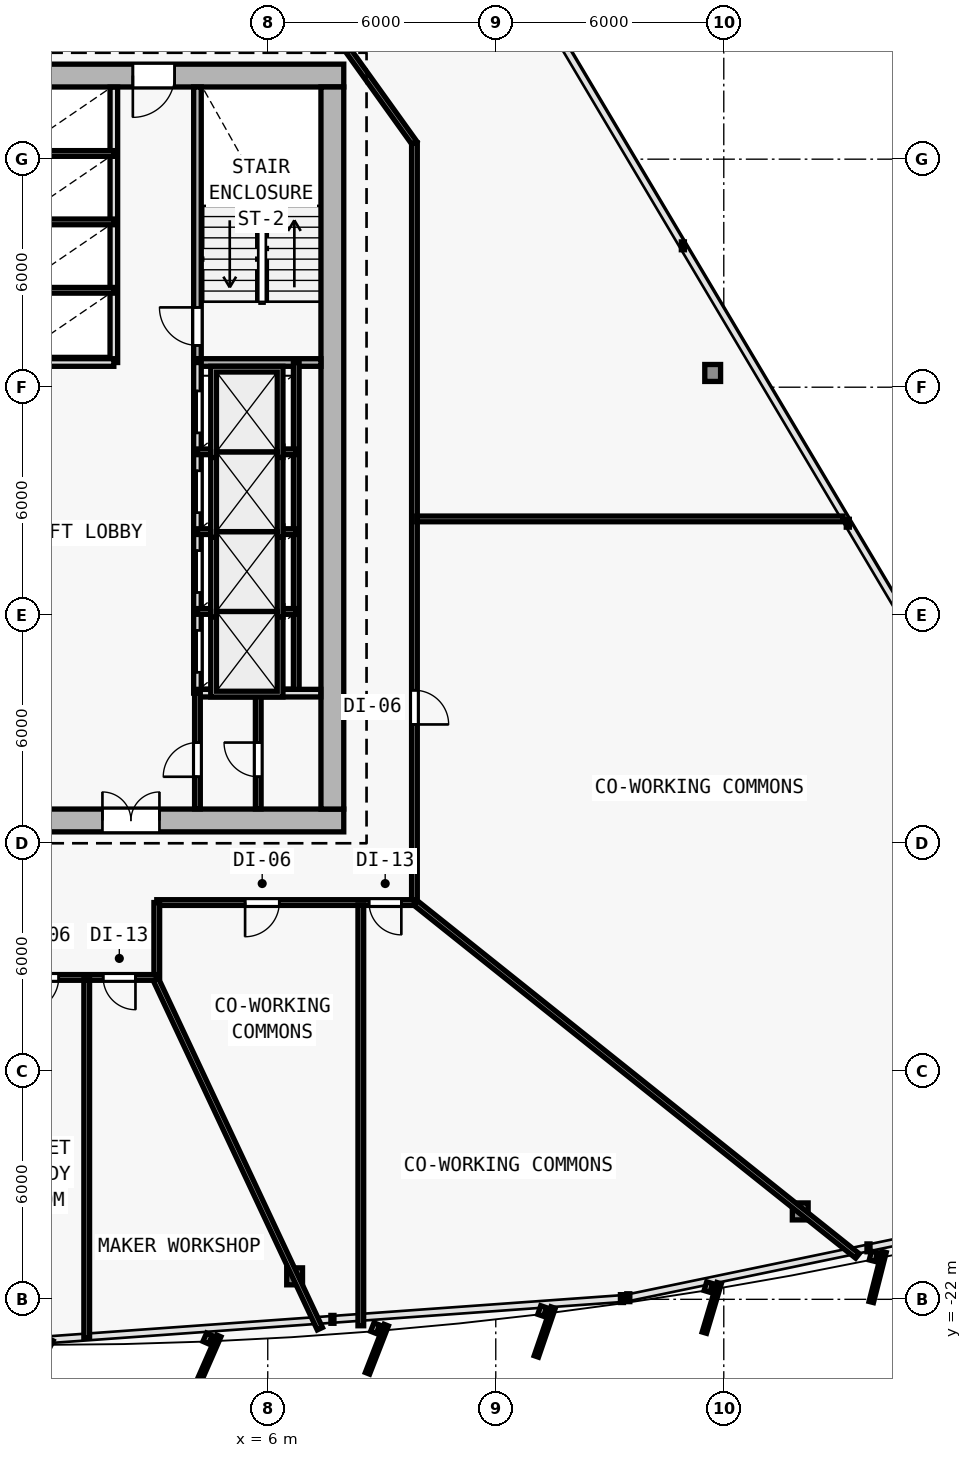
"""IFC4 building model, lengths in metres.
Left out: names, types, materials, properties, quantities, classifications, styles, units other than length and angle.
Written with IfcOpenShell. Run it as: python <this file> out.ifc"""

import sys

from ifc_helpers import new_model, si_unit, direction, frame, frame_2d, origin, origin_2d, place, context, subcontext, project, spatial, rectangle, i_section, extrude, element, fill, save


model = new_model("IFC4")
c1 = context("Model", 3, precision=1e-05, world=origin(), true_north=direction((0.0, 1.0)))
c2 = subcontext(c1, "Body", "Model", "MODEL_VIEW")
j1 = project(units=[si_unit("LENGTHUNIT", "METRE"), si_unit("PLANEANGLEUNIT", "RADIAN")], contexts=[c1])
p1 = place(None, origin())
s1 = spatial("IfcSite", under=j1, at=p1, CompositionType="ELEMENT")
p2 = place(p1, origin())
s2 = spatial("IfcBuilding", under=s1, at=p2, CompositionType="ELEMENT")
p3 = place(p2, frame((0.0, 0.0, 44.4)))
s3 = spatial("IfcBuildingStorey", under=s2, at=p3, CompositionType="ELEMENT", Elevation=44.4)
for number, where, z_axis, x_axis in (
    (1, (7.7, -9.4, 0.0), (0.0, 0.0, 1.0), (1.0, 0.0, 0.0)),
    (2, (7.7, 10.2, 0.0), (0.0, 0.0, 1.0), (1.0, 0.0, 0.0)),
    (3, (7.7, 0.4, 0.0), (0.0, 0.0, 1.0), (1.0, 0.0, 0.0)),
):
    element("IfcColumn", number, at=place(p3, frame(where, z_axis=z_axis, x_axis=x_axis)), inside=s3, PredefinedType="COLUMN", context=c2, shape_type="SweptSolid", body=[
        extrude(i_section(OverallWidth=0.416, OverallDepth=0.446, WebThickness=0.025, FlangeThickness=0.04, FilletRadius=0.015, at=origin_2d()), origin(), (0.0, 0.0, 1.0), 3.6),
    ])
p4 = place(p3, frame((6.707, -21.395, 0.006), z_axis=(-0.006934288159, 0.035283289748, 0.999353293441), x_axis=(-0.981229659911, -0.192842823335, 0.0)))
e4 = element("IfcColumn", 4, at=p4, inside=s3, PredefinedType="COLUMN", context=c2, shape_type="SweptSolid", body=[
    extrude(i_section(OverallWidth=0.416, OverallDepth=0.446, WebThickness=0.025, FlangeThickness=0.04, FilletRadius=0.015, at=origin_2d()), origin(), (0.0, 0.0, 1.0), 3.591),
])
p5 = place(p3, frame((20.012, -19.687, 0.006), z_axis=(-0.020596245868, 0.03357935795, 0.999223809452), x_axis=(-0.852427604955, -0.522845271865, 0.0)))
e5 = element("IfcColumn", 5, at=p5, inside=s3, PredefinedType="COLUMN", context=c2, shape_type="SweptSolid", body=[
    extrude(i_section(OverallWidth=0.416, OverallDepth=0.446, WebThickness=0.025, FlangeThickness=0.04, FilletRadius=0.015, at=origin_2d()), origin(), (0.0, 0.0, 1.0), 3.592),
])
p6 = place(p3, frame((17.708, 2.375, 0.006), z_axis=(-0.018975301738, 0.00958966862, 0.999773962543), x_axis=(-0.451048184688, -0.89249959949, 0.0)))
e6 = element("IfcColumn", 6, at=p6, inside=s3, PredefinedType="COLUMN", context=c2, shape_type="SweptSolid", body=[
    extrude(i_section(OverallWidth=0.416, OverallDepth=0.446, WebThickness=0.025, FlangeThickness=0.04, FilletRadius=0.015, at=origin_2d()), origin(), (0.0, 0.0, 1.0), 3.59),
])
p7 = place(p3, frame((-8.0, -9.4, 0.0), z_axis=(0.0, 0.0, 1.0), x_axis=(1.0, 0.0, 0.0)))
e7 = element("IfcWall", 7, at=p7, inside=s3, PredefinedType="SHEAR", context=c2, shape_type="SweptSolid", body=[
    extrude(rectangle(XDim=16.0, YDim=0.6, at=frame_2d((8.0, 0.0))), origin(), (0.0, 0.0, 1.0), 3.35),
])
p8 = place(p7, frame((9.65, 0.0, 0.0)))
e8 = element("IfcOpeningElement", 8, at=p8, cuts=e7, PredefinedType="OPENING", context=c2, shape_type="SweptSolid", body=[
    extrude(rectangle(XDim=1.5, YDim=2.2, at=frame_2d((0.75, 1.1))), frame((0.0, 0.31, 0.0), z_axis=(0.0, -1.0, 0.0), x_axis=(1.0, 0.0, 0.0)), (0.0, 0.0, 1.0), 0.62),
])
p9 = place(p3, frame((8.0, 10.2, 0.0), z_axis=(0.0, 0.0, 1.0), x_axis=(-1.0, 0.0, 0.0)))
e9 = element("IfcWall", 9, at=p9, inside=s3, PredefinedType="SHEAR", context=c2, shape_type="SweptSolid", body=[
    extrude(rectangle(XDim=16.0, YDim=0.6, at=frame_2d((8.0, 0.0))), origin(), (0.0, 0.0, 1.0), 3.35),
])
p10 = place(p9, frame((4.45, 0.0, 0.0)))
e10 = element("IfcOpeningElement", 10, at=p10, cuts=e9, PredefinedType="OPENING", context=c2, shape_type="SweptSolid", body=[
    extrude(rectangle(XDim=1.1, YDim=2.15, at=frame_2d((0.55, 1.075))), frame((0.0, 0.31, 0.0), z_axis=(0.0, -1.0, 0.0), x_axis=(1.0, 0.0, 0.0)), (0.0, 0.0, 1.0), 0.62),
])
p11 = place(p3, frame((7.7, 9.9, 0.0), z_axis=(0.0, 0.0, 1.0), x_axis=(0.0, -1.0, 0.0)))
e11 = element("IfcWall", 11, at=p11, inside=s3, PredefinedType="SHEAR", context=c2, shape_type="SweptSolid", body=[
    extrude(rectangle(XDim=19.0, YDim=0.6, at=frame_2d((9.5, 0.0))), origin(), (0.0, 0.0, 1.0), 3.35),
])
p12 = place(p3, frame((4.15, 2.75, 0.0), z_axis=(0.0, 0.0, 1.0), x_axis=(0.0, 1.0, 0.0)))
e12 = element("IfcWall", 12, at=p12, inside=s3, PredefinedType="SOLIDWALL", context=c2, shape_type="SweptSolid", body=[
    extrude(rectangle(XDim=7.15, YDim=0.2, at=frame_2d((3.575, 0.0))), origin(), (0.0, 0.0, 1.0), 3.35),
])
p13 = place(p12, frame((0.35, 0.0, 0.0)))
e13 = element("IfcOpeningElement", 13, at=p13, cuts=e12, PredefinedType="OPENING", context=c2, shape_type="SweptSolid", body=[
    extrude(rectangle(XDim=1.0, YDim=2.15, at=frame_2d((0.5, 1.075))), frame((0.0, 0.11, 0.0), z_axis=(0.0, -1.0, 0.0), x_axis=(1.0, 0.0, 0.0)), (0.0, 0.0, 1.0), 0.22),
])
p14 = place(p3, frame((4.05, 2.65, 0.0), z_axis=(0.0, 0.0, 1.0), x_axis=(1.0, 0.0, 0.0)))
e14 = element("IfcWall", 14, at=p14, inside=s3, PredefinedType="SOLIDWALL", context=c2, shape_type="SweptSolid", body=[
    extrude(rectangle(XDim=3.35, YDim=0.2, at=frame_2d((1.675, 0.0))), origin(), (0.0, 0.0, 1.0), 3.35),
])
p15 = place(p3, frame((4.15, -6.05, 0.0), z_axis=(0.0, 0.0, 1.0), x_axis=(0.0, 1.0, 0.0)))
e15 = element("IfcWall", 15, at=p15, inside=s3, PredefinedType="SOLIDWALL", context=c2, shape_type="SweptSolid", body=[
    extrude(rectangle(XDim=8.7, YDim=0.2, at=frame_2d((4.35, 0.0))), origin(), (0.0, 0.0, 1.0), 3.35),
])
p16 = place(p15, frame((0.55, 0.0, 0.0)))
e16 = element("IfcOpeningElement", 16, at=p16, cuts=e15, PredefinedType="OPENING", context=c2, shape_type="SweptSolid", body=[
    extrude(rectangle(XDim=1.1, YDim=2.15, at=frame_2d((0.55, 1.075))), frame((0.0, 0.11, 0.0), z_axis=(0.0, -1.0, 0.0), x_axis=(1.0, 0.0, 0.0)), (0.0, 0.0, 1.0), 0.22),
])
p17 = place(p15, frame((2.65, 0.0, 0.0)))
e17 = element("IfcOpeningElement", 17, at=p17, cuts=e15, PredefinedType="OPENING", context=c2, shape_type="SweptSolid", body=[
    extrude(rectangle(XDim=1.1, YDim=2.15, at=frame_2d((0.55, 1.075))), frame((0.0, 0.11, 0.0), z_axis=(0.0, -1.0, 0.0), x_axis=(1.0, 0.0, 0.0)), (0.0, 0.0, 1.0), 0.22),
])
p18 = place(p15, frame((4.75, 0.0, 0.0)))
e18 = element("IfcOpeningElement", 18, at=p18, cuts=e15, PredefinedType="OPENING", context=c2, shape_type="SweptSolid", body=[
    extrude(rectangle(XDim=1.1, YDim=2.15, at=frame_2d((0.55, 1.075))), frame((0.0, 0.11, 0.0), z_axis=(0.0, -1.0, 0.0), x_axis=(1.0, 0.0, 0.0)), (0.0, 0.0, 1.0), 0.22),
])
p19 = place(p15, frame((6.85, 0.0, 0.0)))
e19 = element("IfcOpeningElement", 19, at=p19, cuts=e15, PredefinedType="OPENING", context=c2, shape_type="SweptSolid", body=[
    extrude(rectangle(XDim=1.1, YDim=2.15, at=frame_2d((0.55, 1.075))), frame((0.0, 0.11, 0.0), z_axis=(0.0, -1.0, 0.0), x_axis=(1.0, 0.0, 0.0)), (0.0, 0.0, 1.0), 0.22),
])
p20 = place(p3, frame((6.75, -6.05, 0.0), z_axis=(0.0, 0.0, 1.0), x_axis=(0.0, 1.0, 0.0)))
e20 = element("IfcWall", 20, at=p20, inside=s3, PredefinedType="PARTITIONING", context=c2, shape_type="SweptSolid", body=[
    extrude(rectangle(XDim=8.7, YDim=0.15, at=frame_2d((4.35, 0.0))), origin(), (0.0, 0.0, 1.0), 3.35),
])
for number, where, z_axis, x_axis in (
    (21, (4.15, -3.9, 0.0), (0.0, 0.0, 1.0), (1.0, 0.0, 0.0)),
    (22, (4.15, -1.8, 0.0), (0.0, 0.0, 1.0), (1.0, 0.0, 0.0)),
    (23, (4.15, 0.3, 0.0), (0.0, 0.0, 1.0), (1.0, 0.0, 0.0)),
):
    element("IfcWall", number, at=place(p3, frame(where, z_axis=z_axis, x_axis=x_axis)), inside=s3, PredefinedType="PARTITIONING", context=c2, shape_type="SweptSolid", body=[
        extrude(rectangle(XDim=2.6, YDim=0.15, at=frame_2d((1.3, 0.0))), origin(), (0.0, 0.0, 1.0), 3.35),
    ])
p21 = place(p3, frame((1.95, 2.65, 0.0), z_axis=(0.0, 0.0, 1.0), x_axis=(0.0, 1.0, 0.0)))
e24 = element("IfcWall", 24, at=p21, inside=s3, PredefinedType="SOLIDWALL", context=c2, shape_type="SweptSolid", body=[
    extrude(rectangle(XDim=7.245, YDim=0.2, at=frame_2d((3.623, 0.0))), origin(), (0.0, 0.0, 1.0), 3.35),
])
p22 = place(p3, frame((-0.95, 2.65, 0.0), z_axis=(0.0, 0.0, 1.0), x_axis=(1.0, 0.0, 0.0)))
e25 = element("IfcWall", 25, at=p22, inside=s3, PredefinedType="SOLIDWALL", context=c2, shape_type="SweptSolid", body=[
    extrude(rectangle(XDim=2.9, YDim=0.2, at=frame_2d((1.45, 0.0))), origin(), (0.0, 0.0, 1.0), 3.35),
])
for number, where, z_axis, x_axis in (
    (26, (-0.75, 4.55, 0.0), (0.0, 0.0, 1.0), (1.0, 0.0, 0.0)),
    (27, (-0.75, 6.35, 0.0), (0.0, 0.0, 1.0), (1.0, 0.0, 0.0)),
    (28, (-0.75, 8.15, 0.0), (0.0, 0.0, 1.0), (1.0, 0.0, 0.0)),
):
    element("IfcWall", number, at=place(p3, frame(where, z_axis=z_axis, x_axis=x_axis)), inside=s3, PredefinedType="PARTITIONING", context=c2, shape_type="SweptSolid", body=[
        extrude(rectangle(XDim=2.7, YDim=0.15, at=frame_2d((1.35, 0.0))), origin(), (0.0, 0.0, 1.0), 3.35),
    ])
p23 = place(p3, frame((4.15, -6.05, 0.0), z_axis=(0.0, 0.0, 1.0), x_axis=(1.0, 0.0, 0.0)))
e29 = element("IfcWall", 29, at=p23, inside=s3, PredefinedType="SOLIDWALL", context=c2, shape_type="SweptSolid", body=[
    extrude(rectangle(XDim=3.245, YDim=0.2, at=frame_2d((1.623, 0.0))), origin(), (0.0, 0.0, 1.0), 3.35),
])
p24 = place(p3, frame((4.15, -9.095, 0.0), z_axis=(0.0, 0.0, 1.0), x_axis=(0.0, 1.0, 0.0)))
e30 = element("IfcWall", 30, at=p24, inside=s3, PredefinedType="PARTITIONING", context=c2, shape_type="SweptSolid", body=[
    extrude(rectangle(XDim=3.045, YDim=0.15, at=frame_2d((1.522, 0.0))), origin(), (0.0, 0.0, 1.0), 3.35),
])
p25 = place(p24, frame((0.845, 0.0, 0.0)))
e31 = element("IfcOpeningElement", 31, at=p25, cuts=e30, PredefinedType="OPENING", context=c2, shape_type="SweptSolid", body=[
    extrude(rectangle(XDim=0.9, YDim=2.1, at=frame_2d((0.45, 1.05))), frame((0.0, 0.085, 0.0), z_axis=(0.0, -1.0, 0.0), x_axis=(1.0, 0.0, 0.0)), (0.0, 0.0, 1.0), 0.17),
])
p26 = place(p3, frame((5.75, -9.095, 0.0), z_axis=(0.0, 0.0, 1.0), x_axis=(0.0, 1.0, 0.0)))
e32 = element("IfcWall", 32, at=p26, inside=s3, PredefinedType="PARTITIONING", context=c2, shape_type="SweptSolid", body=[
    extrude(rectangle(XDim=3.045, YDim=0.15, at=frame_2d((1.522, 0.0))), origin(), (0.0, 0.0, 1.0), 3.35),
])
p27 = place(p26, frame((0.845, 0.0, 0.0)))
e33 = element("IfcOpeningElement", 33, at=p27, cuts=e32, PredefinedType="OPENING", context=c2, shape_type="SweptSolid", body=[
    extrude(rectangle(XDim=0.9, YDim=2.1, at=frame_2d((0.45, 1.05))), frame((0.0, 0.085, 0.0), z_axis=(0.0, -1.0, 0.0), x_axis=(1.0, 0.0, 0.0)), (0.0, 0.0, 1.0), 0.17),
])
p28 = place(p3, frame((7.041, 12.36, 0.0), z_axis=(0.0, 0.0, 1.0), x_axis=(0.582449511476, -0.812866881218, 0.0)))
e34 = element("IfcWall", 34, at=p28, inside=s3, PredefinedType="PARTITIONING", context=c2, shape_type="SweptSolid", body=[
    extrude(rectangle(XDim=4.84, YDim=0.15, at=frame_2d((2.42, 0.0))), origin(), (0.0, 0.0, 1.0), 2.725),
])
p29 = place(p3, frame((9.86, 8.426, 0.0), z_axis=(0.0, 0.0, 1.0), x_axis=(0.0, -1.0, 0.0)))
e35 = element("IfcWall", 35, at=p29, inside=s3, PredefinedType="PARTITIONING", context=c2, shape_type="SweptSolid", body=[
    extrude(rectangle(XDim=19.986, YDim=0.15, at=frame_2d((9.993, 0.0))), origin(), (0.0, 0.0, 1.0), 2.609),
])
p30 = place(p29, frame((14.399, 0.0, 0.0)))
e36 = element("IfcOpeningElement", 36, at=p30, cuts=e35, PredefinedType="OPENING", context=c2, shape_type="SweptSolid", body=[
    extrude(rectangle(XDim=0.9, YDim=2.1, at=frame_2d((0.45, 1.05))), frame((0.0, 0.085, 0.0), z_axis=(0.0, -1.0, 0.0), x_axis=(1.0, 0.0, 0.0)), (0.0, 0.0, 1.0), 0.17),
])
p31 = place(p3, frame((9.86, -11.56, 0.0), z_axis=(0.0, 0.0, 1.0), x_axis=(-1.0, 0.0, 0.0)))
e37 = element("IfcWall", 37, at=p31, inside=s3, PredefinedType="PARTITIONING", context=c2, shape_type="SweptSolid", body=[
    extrude(rectangle(XDim=6.78, YDim=0.15, at=frame_2d((3.39, 0.0))), origin(), (0.0, 0.0, 1.0), 2.609),
])
p32 = place(p31, frame((3.556, 0.0, 0.0)))
e38 = element("IfcOpeningElement", 38, at=p32, cuts=e37, PredefinedType="OPENING", context=c2, shape_type="SweptSolid", body=[
    extrude(rectangle(XDim=0.9, YDim=2.1, at=frame_2d((0.45, 1.05))), frame((0.0, 0.085, 0.0), z_axis=(0.0, -1.0, 0.0), x_axis=(1.0, 0.0, 0.0)), (0.0, 0.0, 1.0), 0.17),
])
p33 = place(p31, frame((0.344, 0.0, 0.0)))
e39 = element("IfcOpeningElement", 39, at=p33, cuts=e37, PredefinedType="OPENING", context=c2, shape_type="SweptSolid", body=[
    extrude(rectangle(XDim=0.85, YDim=2.1, at=frame_2d((0.425, 1.05))), frame((0.0, 0.085, 0.0), z_axis=(0.0, -1.0, 0.0), x_axis=(1.0, 0.0, 0.0)), (0.0, 0.0, 1.0), 0.17),
])
p34 = place(p3, frame((3.08, -11.56, 0.0), z_axis=(0.0, 0.0, 1.0), x_axis=(0.0, -1.0, 0.0)))
e40 = element("IfcWall", 40, at=p34, inside=s3, PredefinedType="PARTITIONING", context=c2, shape_type="SweptSolid", body=[
    extrude(rectangle(XDim=1.97, YDim=0.15, at=frame_2d((0.985, 0.0))), origin(), (0.0, 0.0, 1.0), 3.025),
])
p35 = place(p3, frame((3.08, -13.53, 0.0), z_axis=(0.0, 0.0, 1.0), x_axis=(-1.0, 0.0, 0.0)))
e41 = element("IfcWall", 41, at=p35, inside=s3, PredefinedType="PARTITIONING", context=c2, shape_type="SweptSolid", body=[
    extrude(rectangle(XDim=6.16, YDim=0.15, at=frame_2d((3.08, 0.0))), origin(), (0.0, 0.0, 1.0), 2.725),
])
p36 = place(p35, frame((4.69, 0.0, 0.0)))
e42 = element("IfcOpeningElement", 42, at=p36, cuts=e41, PredefinedType="OPENING", context=c2, shape_type="SweptSolid", body=[
    extrude(rectangle(XDim=0.9, YDim=2.1, at=frame_2d((0.45, 1.05))), frame((0.0, 0.085, 0.0), z_axis=(0.0, -1.0, 0.0), x_axis=(1.0, 0.0, 0.0)), (0.0, 0.0, 1.0), 0.17),
])
p37 = place(p35, frame((2.581, 0.0, 0.0)))
e43 = element("IfcOpeningElement", 43, at=p37, cuts=e41, PredefinedType="OPENING", context=c2, shape_type="SweptSolid", body=[
    extrude(rectangle(XDim=0.9, YDim=2.1, at=frame_2d((0.45, 1.05))), frame((0.0, 0.085, 0.0), z_axis=(0.0, -1.0, 0.0), x_axis=(1.0, 0.0, 0.0)), (0.0, 0.0, 1.0), 0.17),
])
p38 = place(p35, frame((0.561, 0.0, 0.0)))
e44 = element("IfcOpeningElement", 44, at=p38, cuts=e41, PredefinedType="OPENING", context=c2, shape_type="SweptSolid", body=[
    extrude(rectangle(XDim=0.85, YDim=2.1, at=frame_2d((0.425, 1.05))), frame((0.0, 0.085, 0.0), z_axis=(0.0, -1.0, 0.0), x_axis=(1.0, 0.0, 0.0)), (0.0, 0.0, 1.0), 0.17),
])
p39 = place(p3, frame((3.053, -13.579, 0.0), z_axis=(0.0, 0.0, 1.0), x_axis=(0.425109320036, -0.905142014282, 0.0)))
e45 = element("IfcWall", 45, at=p39, inside=s3, PredefinedType="PARTITIONING", context=c2, shape_type="SweptSolid", body=[
    extrude(rectangle(XDim=10.157, YDim=0.15, at=frame_2d((5.079, 0.0))), origin(), (0.0, 0.0, 1.0), 2.725),
])
p40 = place(p3, frame((9.888, -11.569, 0.0), z_axis=(0.0, 0.0, 1.0), x_axis=(0.781299107074, -0.624156795433, 0.0)))
e46 = element("IfcWall", 46, at=p40, inside=s3, PredefinedType="PARTITIONING", context=c2, shape_type="SweptSolid", body=[
    extrude(rectangle(XDim=14.884, YDim=0.15, at=frame_2d((7.442, 0.0))), origin(), (0.0, 0.0, 1.0), 2.609),
])
p41 = place(p3, frame((1.236, -13.59, 0.0), z_axis=(0.0, 0.0, 1.0), x_axis=(0.0, -1.0, 0.0)))
e47 = element("IfcWall", 47, at=p41, inside=s3, PredefinedType="PARTITIONING", context=c2, shape_type="SweptSolid", body=[
    extrude(rectangle(XDim=9.427, YDim=0.15, at=frame_2d((4.714, 0.0))), origin(), (0.0, 0.0, 1.0), 2.735),
])
p42 = place(p3, frame((8.449, -11.62, 0.0), z_axis=(0.0, 0.0, 1.0), x_axis=(0.0, -1.0, 0.0)))
e48 = element("IfcWall", 48, at=p42, inside=s3, PredefinedType="PARTITIONING", context=c2, shape_type="SweptSolid", body=[
    extrude(rectangle(XDim=11.075, YDim=0.15, at=frame_2d((5.538, 0.0))), origin(), (0.0, 0.0, 1.0), 2.735),
])
p43 = place(p3, frame((9.92, -1.465, 0.0), z_axis=(0.0, 0.0, 1.0), x_axis=(1.0, 0.0, 0.0)))
e49 = element("IfcWall", 49, at=p43, inside=s3, PredefinedType="PARTITIONING", context=c2, shape_type="SweptSolid", body=[
    extrude(rectangle(XDim=11.218, YDim=0.15, at=frame_2d((5.609, 0.0))), origin(), (0.0, 0.0, 1.0), 2.735),
])
p44 = place(p8, origin())
e50 = element("IfcDoor", 50, at=p44, inside=s3, OperationType="DOUBLE_DOOR_SINGLE_SWING", PredefinedType="DOOR", context=c2, shape_type="SweptSolid", body=[
    extrude(rectangle(XDim=1.5, YDim=2.2, at=frame_2d((0.75, 1.1))), frame((0.0, 0.025, 0.0), z_axis=(0.0, -1.0, 0.0), x_axis=(1.0, 0.0, 0.0)), (0.0, 0.0, 1.0), 0.05),
])
fill(e8, e50)
p45 = place(p10, origin())
e51 = element("IfcDoor", 51, at=p45, inside=s3, OperationType="SINGLE_SWING_RIGHT", PredefinedType="DOOR", context=c2, shape_type="SweptSolid", body=[
    extrude(rectangle(XDim=1.1, YDim=2.15, at=frame_2d((0.55, 1.075))), frame((0.0, 0.025, 0.0), z_axis=(0.0, -1.0, 0.0), x_axis=(1.0, 0.0, 0.0)), (0.0, 0.0, 1.0), 0.05),
])
fill(e10, e51)
p46 = place(p13, origin())
e52 = element("IfcDoor", 52, at=p46, inside=s3, OperationType="SINGLE_SWING_RIGHT", PredefinedType="DOOR", context=c2, shape_type="SweptSolid", body=[
    extrude(rectangle(XDim=1.0, YDim=2.15, at=frame_2d((0.5, 1.075))), frame((0.0, 0.025, 0.0), z_axis=(0.0, -1.0, 0.0), x_axis=(1.0, 0.0, 0.0)), (0.0, 0.0, 1.0), 0.05),
])
fill(e13, e52)
p47 = place(p16, origin())
e53 = element("IfcDoor", 53, at=p47, inside=s3, OperationType="DOUBLE_DOOR_SLIDING", PredefinedType="DOOR", context=c2, shape_type="SweptSolid", body=[
    extrude(rectangle(XDim=1.1, YDim=2.15, at=frame_2d((0.55, 1.075))), frame((0.0, 0.025, 0.0), z_axis=(0.0, -1.0, 0.0), x_axis=(1.0, 0.0, 0.0)), (0.0, 0.0, 1.0), 0.05),
])
fill(e16, e53)
p48 = place(p17, origin())
e54 = element("IfcDoor", 54, at=p48, inside=s3, OperationType="DOUBLE_DOOR_SLIDING", PredefinedType="DOOR", context=c2, shape_type="SweptSolid", body=[
    extrude(rectangle(XDim=1.1, YDim=2.15, at=frame_2d((0.55, 1.075))), frame((0.0, 0.025, 0.0), z_axis=(0.0, -1.0, 0.0), x_axis=(1.0, 0.0, 0.0)), (0.0, 0.0, 1.0), 0.05),
])
fill(e17, e54)
p49 = place(p18, origin())
e55 = element("IfcDoor", 55, at=p49, inside=s3, OperationType="DOUBLE_DOOR_SLIDING", PredefinedType="DOOR", context=c2, shape_type="SweptSolid", body=[
    extrude(rectangle(XDim=1.1, YDim=2.15, at=frame_2d((0.55, 1.075))), frame((0.0, 0.025, 0.0), z_axis=(0.0, -1.0, 0.0), x_axis=(1.0, 0.0, 0.0)), (0.0, 0.0, 1.0), 0.05),
])
fill(e18, e55)
p50 = place(p19, origin())
e56 = element("IfcDoor", 56, at=p50, inside=s3, OperationType="DOUBLE_DOOR_SLIDING", PredefinedType="DOOR", context=c2, shape_type="SweptSolid", body=[
    extrude(rectangle(XDim=1.1, YDim=2.15, at=frame_2d((0.55, 1.075))), frame((0.0, 0.025, 0.0), z_axis=(0.0, -1.0, 0.0), x_axis=(1.0, 0.0, 0.0)), (0.0, 0.0, 1.0), 0.05),
])
fill(e19, e56)
p51 = place(p25, origin())
e57 = element("IfcDoor", 57, at=p51, inside=s3, OperationType="SINGLE_SWING_LEFT", PredefinedType="DOOR", context=c2, shape_type="SweptSolid", body=[
    extrude(rectangle(XDim=0.9, YDim=2.1, at=frame_2d((0.45, 1.05))), frame((0.0, 0.025, 0.0), z_axis=(0.0, -1.0, 0.0), x_axis=(1.0, 0.0, 0.0)), (0.0, 0.0, 1.0), 0.05),
])
fill(e31, e57)
p52 = place(p27, origin())
e58 = element("IfcDoor", 58, at=p52, inside=s3, OperationType="SINGLE_SWING_RIGHT", PredefinedType="DOOR", context=c2, shape_type="SweptSolid", body=[
    extrude(rectangle(XDim=0.9, YDim=2.1, at=frame_2d((0.45, 1.05))), frame((0.0, 0.025, 0.0), z_axis=(0.0, -1.0, 0.0), x_axis=(1.0, 0.0, 0.0)), (0.0, 0.0, 1.0), 0.05),
])
fill(e33, e58)
p53 = place(p37, origin())
e59 = element("IfcDoor", 59, at=p53, inside=s3, OperationType="SINGLE_SWING_RIGHT", PredefinedType="DOOR", context=c2, shape_type="SweptSolid", body=[
    extrude(rectangle(XDim=0.9, YDim=2.1, at=frame_2d((0.45, 1.05))), frame((0.0, 0.025, 0.0), z_axis=(0.0, -1.0, 0.0), x_axis=(1.0, 0.0, 0.0)), (0.0, 0.0, 1.0), 0.05),
])
fill(e43, e59)
p54 = place(p38, origin())
e60 = element("IfcDoor", 60, at=p54, inside=s3, OperationType="SINGLE_SWING_LEFT", PredefinedType="DOOR", context=c2, shape_type="SweptSolid", body=[
    extrude(rectangle(XDim=0.85, YDim=2.1, at=frame_2d((0.425, 1.05))), frame((0.0, 0.025, 0.0), z_axis=(0.0, -1.0, 0.0), x_axis=(1.0, 0.0, 0.0)), (0.0, 0.0, 1.0), 0.05),
])
fill(e44, e60)
p55 = place(p32, origin())
e61 = element("IfcDoor", 61, at=p55, inside=s3, OperationType="SINGLE_SWING_RIGHT", PredefinedType="DOOR", context=c2, shape_type="SweptSolid", body=[
    extrude(rectangle(XDim=0.9, YDim=2.1, at=frame_2d((0.45, 1.05))), frame((0.0, 0.025, 0.0), z_axis=(0.0, -1.0, 0.0), x_axis=(1.0, 0.0, 0.0)), (0.0, 0.0, 1.0), 0.05),
])
fill(e38, e61)
p56 = place(p33, origin())
e62 = element("IfcDoor", 62, at=p56, inside=s3, OperationType="SINGLE_SWING_LEFT", PredefinedType="DOOR", context=c2, shape_type="SweptSolid", body=[
    extrude(rectangle(XDim=0.85, YDim=2.1, at=frame_2d((0.425, 1.05))), frame((0.0, 0.025, 0.0), z_axis=(0.0, -1.0, 0.0), x_axis=(1.0, 0.0, 0.0)), (0.0, 0.0, 1.0), 0.05),
])
fill(e39, e62)
p57 = place(p30, origin())
e63 = element("IfcDoor", 63, at=p57, inside=s3, OperationType="SINGLE_SWING_RIGHT", PredefinedType="DOOR", context=c2, shape_type="SweptSolid", body=[
    extrude(rectangle(XDim=0.9, YDim=2.1, at=frame_2d((0.45, 1.05))), frame((0.0, 0.025, 0.0), z_axis=(0.0, -1.0, 0.0), x_axis=(1.0, 0.0, 0.0)), (0.0, 0.0, 1.0), 0.05),
])
fill(e36, e63)
save(model, sys.argv[1])
